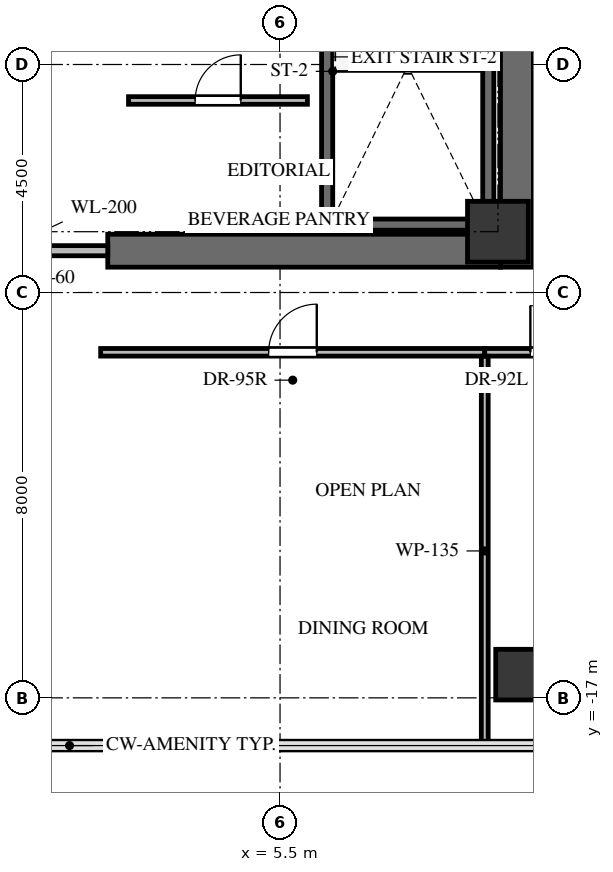
"""IFC4 building model, lengths in metres.
Left out: names, types, materials, properties, quantities, classifications, styles, units other than length and angle.
Written with IfcOpenShell. Run it as: python <this file> out.ifc"""

import sys

from ifc_helpers import new_model, si_unit, direction, frame, frame_2d, origin, origin_2d, place, context, subcontext, project, spatial, rectangle, extrude, source, transform, mapped, element, fill, save


model = new_model("IFC4")
c1 = context("Model", 3, precision=1e-05, world=origin(), true_north=direction((0.0, 1.0)))
c2 = subcontext(c1, "Body", "Model", "MODEL_VIEW")
j1 = project(units=[si_unit("LENGTHUNIT", "METRE"), si_unit("PLANEANGLEUNIT", "RADIAN")], contexts=[c1])
p1 = place(None, origin())
s1 = spatial("IfcSite", under=j1, at=p1, CompositionType="ELEMENT")
p2 = place(p1, origin())
s2 = spatial("IfcBuilding", under=s1, at=p2, CompositionType="ELEMENT")
p3 = place(p2, frame((0.0, 0.0, 155.1)))
s3 = spatial("IfcBuildingStorey", under=s2, at=p3, CompositionType="ELEMENT", Elevation=155.1)
p4 = place(p3, frame((10.175, -8.5, 0.0), z_axis=(0.0, 0.0, 1.0), x_axis=(0.0, 1.0, 0.0)))
e1 = element("IfcWall", 1, at=p4, inside=s3, PredefinedType="SHEAR", context=c2, shape_type="SweptSolid", body=[
    extrude(rectangle(XDim=17.0, YDim=0.65, at=frame_2d((8.5, 0.0))), origin(), (0.0, 0.0, 1.0), 4.2),
])
p5 = place(p3, frame((2.1, -8.175, 0.0), z_axis=(0.0, 0.0, 1.0), x_axis=(1.0, 0.0, 0.0)))
e2 = element("IfcWall", 2, at=p5, inside=s3, PredefinedType="SHEAR", context=c2, shape_type="SweptSolid", body=[
    extrude(rectangle(XDim=7.75, YDim=0.65, at=frame_2d((3.875, 0.0))), origin(), (0.0, 0.0, 1.0), 4.2),
])
p6 = place(p3, frame((9.61, -7.77, -0.32), z_axis=(0.0, 0.0, 1.0), x_axis=(0.0, 1.0, 0.0)))
e3 = element("IfcWall", 3, at=p6, inside=s3, PredefinedType="SHEAR", context=c2, shape_type="SweptSolid", body=[
    extrude(rectangle(XDim=7.89, YDim=0.22, at=frame_2d((3.945, 0.0))), origin(), (0.0, 0.0, 1.0), 4.28),
])
p7 = place(p3, frame((6.43, 0.12, -0.32), z_axis=(0.0, 0.0, 1.0), x_axis=(0.0, -1.0, 0.0)))
e4 = element("IfcWall", 4, at=p7, inside=s3, PredefinedType="SHEAR", context=c2, shape_type="SweptSolid", body=[
    extrude(rectangle(XDim=7.89, YDim=0.22, at=frame_2d((3.945, 0.0))), origin(), (0.0, 0.0, 1.0), 4.28),
])
p8 = place(p7, frame((0.52, 0.0, 0.0)))
e5 = element("IfcOpeningElement", 5, at=p8, cuts=e4, PredefinedType="OPENING", context=c2, shape_type="SweptSolid", body=[
    extrude(rectangle(XDim=1.05, YDim=2.15, at=frame_2d((0.525, 1.075))), frame((0.0, 0.12, 0.0), z_axis=(0.0, -1.0, 0.0), x_axis=(1.0, 0.0, 0.0)), (0.0, 0.0, 1.0), 0.24),
])
p9 = place(p3, frame((6.54, -7.66, -0.32), z_axis=(0.0, 0.0, 1.0), x_axis=(1.0, 0.0, 0.0)))
e6 = element("IfcWall", 6, at=p9, inside=s3, PredefinedType="SHEAR", context=c2, shape_type="SweptSolid", body=[
    extrude(rectangle(XDim=2.96, YDim=0.22, at=frame_2d((1.48, 0.0))), origin(), (0.0, 0.0, 1.0), 4.28),
])
m1 = source(origin(), c2, "Body", "SweptSolid", [
    extrude(rectangle(XDim=1.2, YDim=1.2, at=origin_2d()), origin(), (0.0, 0.0, 1.0), 4.28),
])
p10 = place(p3, frame((9.8, -7.8, -0.32), z_axis=(0.0, 0.0, 1.0), x_axis=(1.0, 0.0, 0.0)))
e7 = element("IfcColumn", 7, at=p10, inside=s3, PredefinedType="COLUMN", context=c2, shape_type="MappedRepresentation", body=[
    mapped(m1, transform((0.0, 0.0, 0.0), x_axis=(1.0, 0.0, 0.0), y_axis=(0.0, 1.0, 0.0), z_axis=(0.0, 0.0, 1.0), scale=1.0)),
])
m2 = source(origin(), c2, "Body", "SweptSolid", [
    extrude(rectangle(XDim=1.0, YDim=1.0, at=origin_2d()), origin(), (0.0, 0.0, 1.0), 4.28),
])
p11 = place(p3, frame((10.257, -16.542, -0.32), z_axis=(0.0, 0.0, 1.0), x_axis=(1.0, 0.0, 0.0)))
e8 = element("IfcColumn", 8, at=p11, inside=s3, PredefinedType="COLUMN", context=c2, shape_type="MappedRepresentation", body=[
    mapped(m2, transform((0.0, 0.0, 0.0), x_axis=(1.0, 0.0, 0.0), y_axis=(0.0, 1.0, 0.0), z_axis=(0.0, 0.0, 1.0), scale=1.0)),
])
p12 = place(p3, frame((-2.1, -8.175, 0.0), z_axis=(0.0, 0.0, 1.0), x_axis=(1.0, 0.0, 0.0)))
e9 = element("IfcWall", 9, at=p12, inside=s3, PredefinedType="SOLIDWALL", context=c2, shape_type="SweptSolid", body=[
    extrude(rectangle(XDim=4.2, YDim=0.2, at=frame_2d((2.1, 0.0))), origin(), (0.0, 0.0, 1.0), 3.945),
])
p13 = place(p12, frame((1.2, 0.0, 0.0)))
e10 = element("IfcOpeningElement", 10, at=p13, cuts=e9, PredefinedType="OPENING", context=c2, shape_type="SweptSolid", body=[
    extrude(rectangle(XDim=1.8, YDim=2.15, at=frame_2d((0.9, 1.075))), frame((0.0, 0.11, 0.0), z_axis=(0.0, -1.0, 0.0), x_axis=(1.0, 0.0, 0.0)), (0.0, 0.0, 1.0), 0.22),
])
p14 = place(p3, frame((2.51, -5.21, 0.0), z_axis=(0.0, 0.0, 1.0), x_axis=(1.0, 0.0, 0.0)))
e11 = element("IfcWall", 11, at=p14, inside=s3, PredefinedType="PARTITIONING", context=c2, shape_type="SweptSolid", body=[
    extrude(rectangle(XDim=3.53, YDim=0.15, at=frame_2d((1.765, 0.0))), origin(), (0.0, 0.0, 1.0), 3.945),
])
p15 = place(p14, frame((1.315, 0.0, 0.0)))
e12 = element("IfcOpeningElement", 12, at=p15, cuts=e11, PredefinedType="OPENING", context=c2, shape_type="SweptSolid", body=[
    extrude(rectangle(XDim=0.9, YDim=2.05, at=frame_2d((0.45, 1.025))), frame((0.0, 0.085, 0.0), z_axis=(0.0, -1.0, 0.0), x_axis=(1.0, 0.0, 0.0)), (0.0, 0.0, 1.0), 0.17),
])
p16 = place(p3, frame((1.96, -10.18, 0.0), z_axis=(0.0, 0.0, 1.0), x_axis=(1.0, 0.0, 0.0)))
e13 = element("IfcWall", 13, at=p16, inside=s3, PredefinedType="PARTITIONING", context=c2, shape_type="SweptSolid", body=[
    extrude(rectangle(XDim=7.58, YDim=0.15, at=frame_2d((3.79, 0.0))), origin(), (0.0, 0.0, 1.0), 3.142),
])
p17 = place(p16, frame((3.315, 0.0, 0.0)))
e14 = element("IfcOpeningElement", 14, at=p17, cuts=e13, PredefinedType="OPENING", context=c2, shape_type="SweptSolid", body=[
    extrude(rectangle(XDim=0.95, YDim=2.1, at=frame_2d((0.475, 1.05))), frame((0.0, 0.085, 0.0), z_axis=(0.0, -1.0, 0.0), x_axis=(1.0, 0.0, 0.0)), (0.0, 0.0, 1.0), 0.17),
])
p18 = place(p3, frame((9.54, -10.18, 0.0), z_axis=(0.0, 0.0, 1.0), x_axis=(1.0, 0.0, 0.0)))
e15 = element("IfcWall", 15, at=p18, inside=s3, PredefinedType="PARTITIONING", context=c2, shape_type="SweptSolid", body=[
    extrude(rectangle(XDim=2.72, YDim=0.15, at=frame_2d((1.36, 0.0))), origin(), (0.0, 0.0, 1.0), 3.945),
])
p19 = place(p18, frame((0.9, 0.0, 0.0)))
e16 = element("IfcOpeningElement", 16, at=p19, cuts=e15, PredefinedType="OPENING", context=c2, shape_type="SweptSolid", body=[
    extrude(rectangle(XDim=0.92, YDim=2.1, at=frame_2d((0.46, 1.05))), frame((0.0, 0.085, 0.0), z_axis=(0.0, -1.0, 0.0), x_axis=(1.0, 0.0, 0.0)), (0.0, 0.0, 1.0), 0.17),
])
p20 = place(p3, frame((9.54, -10.259, 0.0), z_axis=(0.0, 0.0, 1.0), x_axis=(0.0, -1.0, 0.0)))
e17 = element("IfcWall", 17, at=p20, inside=s3, PredefinedType="PARTITIONING", context=c2, shape_type="SweptSolid", body=[
    extrude(rectangle(XDim=7.683, YDim=0.135, at=frame_2d((3.841, 0.0))), origin(), (0.0, 0.0, 1.0), 3.142),
])
m3 = source(origin(), c2, "Body", "SweptSolid", [
    extrude(rectangle(XDim=0.9, YDim=2.05, at=frame_2d((0.45, 1.025))), frame((0.0, 0.025, 0.0), z_axis=(0.0, -1.0, 0.0), x_axis=(1.0, 0.0, 0.0)), (0.0, 0.0, 1.0), 0.05),
])
p21 = place(p15, origin())
e18 = element("IfcDoor", 18, at=p21, inside=s3, OperationType="SINGLE_SWING_RIGHT", PredefinedType="DOOR", context=c2, shape_type="MappedRepresentation", body=[
    mapped(m3, transform((0.0, 0.0, 0.0), x_axis=(1.0, 0.0, 0.0), y_axis=(0.0, 1.0, 0.0), z_axis=(0.0, 0.0, 1.0), scale=1.0)),
])
fill(e12, e18)
m4 = source(origin(), c2, "Body", "SweptSolid", [
    extrude(rectangle(XDim=0.95, YDim=2.1, at=frame_2d((0.475, 1.05))), frame((0.0, 0.025, 0.0), z_axis=(0.0, -1.0, 0.0), x_axis=(1.0, 0.0, 0.0)), (0.0, 0.0, 1.0), 0.05),
])
p22 = place(p17, origin())
e19 = element("IfcDoor", 19, at=p22, inside=s3, OperationType="SINGLE_SWING_RIGHT", PredefinedType="DOOR", context=c2, shape_type="MappedRepresentation", body=[
    mapped(m4, transform((0.0, 0.0, 0.0), x_axis=(1.0, 0.0, 0.0), y_axis=(0.0, 1.0, 0.0), z_axis=(0.0, 0.0, 1.0), scale=1.0)),
])
fill(e14, e19)
m5 = source(origin(), c2, "Body", "SweptSolid", [
    extrude(rectangle(XDim=0.92, YDim=2.1, at=frame_2d((0.46, 1.05))), frame((0.0, 0.025, 0.0), z_axis=(0.0, -1.0, 0.0), x_axis=(1.0, 0.0, 0.0)), (0.0, 0.0, 1.0), 0.05),
])
p23 = place(p19, origin())
e20 = element("IfcDoor", 20, at=p23, inside=s3, OperationType="SINGLE_SWING_LEFT", PredefinedType="DOOR", context=c2, shape_type="MappedRepresentation", body=[
    mapped(m5, transform((0.0, 0.0, 0.0), x_axis=(1.0, 0.0, 0.0), y_axis=(0.0, 1.0, 0.0), z_axis=(0.0, 0.0, 1.0), scale=1.0)),
])
fill(e16, e20)
save(model, sys.argv[1])
